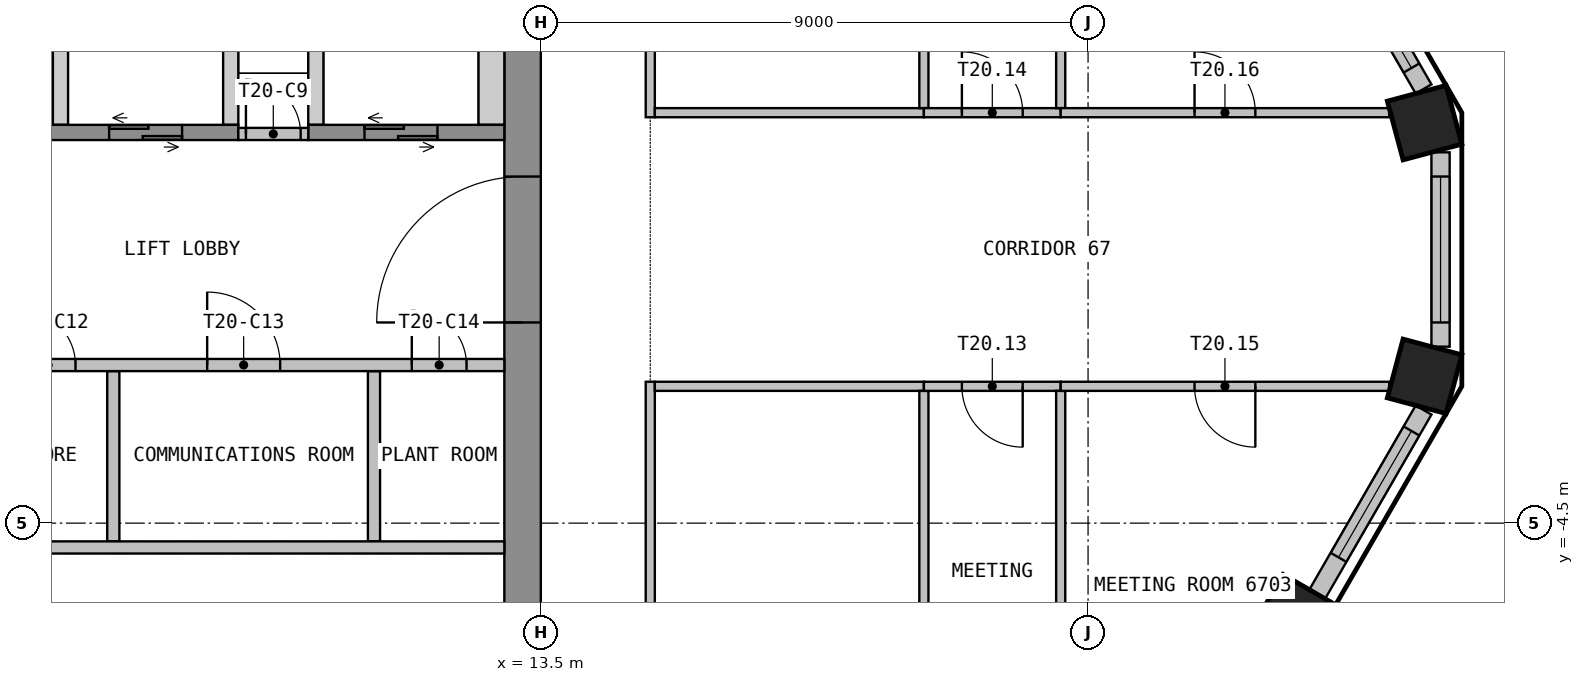
"""IFC4 building model, lengths in metres.
Left out: names, types, materials, properties, quantities, classifications, styles, units other than length and angle.
Written with IfcOpenShell. Run it as: python <this file> out.ifc"""

import sys

from ifc_helpers import new_model, si_unit, direction, frame, frame_2d, origin, origin_2d, place, context, subcontext, project, spatial, polyline, rectangle, outline, extrude, element, fill, save


model = new_model("IFC4")
c1 = context("Model", 3, precision=1e-05, world=origin(), true_north=direction((0.0, 1.0)))
c2 = subcontext(c1, "Body", "Model", "MODEL_VIEW")
j1 = project(units=[si_unit("LENGTHUNIT", "METRE"), si_unit("PLANEANGLEUNIT", "RADIAN")], contexts=[c1])
p1 = place(None, origin())
s1 = spatial("IfcSite", under=j1, at=p1, CompositionType="ELEMENT")
p2 = place(p1, origin())
s2 = spatial("IfcBuilding", under=s1, at=p2, CompositionType="ELEMENT")
p3 = place(p2, frame((0.0, 0.0, 270.3)))
s3 = spatial("IfcBuildingStorey", under=s2, at=p3, CompositionType="ELEMENT", Elevation=270.3)
p4 = place(p3, frame((25.964, -5.897, 0.0), z_axis=(0.0, 0.0, 1.0), x_axis=(0.5, 0.866025403784, 0.0)))
e1 = element("IfcColumn", 1, at=p4, inside=s3, PredefinedType="COLUMN", context=c2, shape_type="SweptSolid", body=[
    extrude(rectangle(XDim=0.7, YDim=1.0, at=origin_2d()), origin(), (0.0, 0.0, 1.0), 3.575),
])
for number, where, z_axis, x_axis in (
    (2, (28.035, -2.086, 0.0), (0.0, 0.0, 1.0), (0.259, 0.966, 0.0)),
    (3, (28.035, 2.086, 0.0), (0.0, 0.0, 1.0), (-0.259, 0.966, 0.0)),
):
    element("IfcColumn", number, at=place(p3, frame(where, z_axis=z_axis, x_axis=x_axis)), inside=s3, PredefinedType="COLUMN", context=c2, shape_type="SweptSolid", body=[
        extrude(rectangle(XDim=1.0, YDim=1.0, at=origin_2d()), origin(), (0.0, 0.0, 1.0), 3.575),
    ])
p5 = place(p3, frame((26.269, -5.669, 0.0), z_axis=(0.0, 0.0, 1.0), x_axis=(0.499990325971, 0.866030989016, 0.0)))
e4 = element("IfcWall", 4, at=p5, inside=s3, PredefinedType="SOLIDWALL", context=c2, shape_type="SweptSolid", body=[
    extrude(rectangle(XDim=3.498, YDim=0.3, at=frame_2d((1.749, 0.0))), origin(), (0.0, 0.0, 1.0), 3.575),
])
p6 = place(p5, frame((0.699, 0.0, 0.9)))
e5 = element("IfcOpeningElement", 5, at=p6, cuts=e4, PredefinedType="OPENING", context=c2, shape_type="SweptSolid", body=[
    extrude(rectangle(XDim=2.4, YDim=2.1, at=frame_2d((1.2, 1.05))), frame((0.0, 0.16, 0.0), z_axis=(0.0, -1.0, 0.0), x_axis=(1.0, 0.0, 0.0)), (0.0, 0.0, 1.0), 0.32),
])
p7 = place(p3, frame((28.297, -1.598, 0.0), z_axis=(0.0, 0.0, 1.0), x_axis=(0.0, 1.0, 0.0)))
e6 = element("IfcWall", 6, at=p7, inside=s3, PredefinedType="SOLIDWALL", context=c2, shape_type="SweptSolid", body=[
    extrude(rectangle(XDim=3.196, YDim=0.3, at=frame_2d((1.598, 0.0))), origin(), (0.0, 0.0, 1.0), 3.575),
])
p8 = place(p7, frame((0.398, 0.0, 0.9)))
e7 = element("IfcOpeningElement", 7, at=p8, cuts=e6, PredefinedType="OPENING", context=c2, shape_type="SweptSolid", body=[
    extrude(rectangle(XDim=2.4, YDim=2.1, at=frame_2d((1.2, 1.05))), frame((0.0, 0.16, 0.0), z_axis=(0.0, -1.0, 0.0), x_axis=(1.0, 0.0, 0.0)), (0.0, 0.0, 1.0), 0.32),
])
p9 = place(p3, frame((28.018, 2.64, 0.0), z_axis=(0.0, 0.0, 1.0), x_axis=(-0.499990325971, 0.866030989016, 0.0)))
e8 = element("IfcWall", 8, at=p9, inside=s3, PredefinedType="SOLIDWALL", context=c2, shape_type="SweptSolid", body=[
    extrude(rectangle(XDim=3.498, YDim=0.3, at=frame_2d((1.749, 0.0))), origin(), (0.0, 0.0, 1.0), 3.575),
])
p10 = place(p9, frame((0.398, 0.0, 0.9)))
e9 = element("IfcOpeningElement", 9, at=p10, cuts=e8, PredefinedType="OPENING", context=c2, shape_type="SweptSolid", body=[
    extrude(rectangle(XDim=2.4, YDim=2.1, at=frame_2d((1.2, 1.05))), frame((0.0, 0.16, 0.0), z_axis=(0.0, -1.0, 0.0), x_axis=(1.0, 0.0, 0.0)), (0.0, 0.0, 1.0), 0.32),
])
p11 = place(p3, frame((13.2, -10.65, 0.0), z_axis=(0.0, 0.0, 1.0), x_axis=(0.0, 1.0, 0.0)))
e10 = element("IfcWall", 10, at=p11, inside=s3, PredefinedType="SHEAR", context=c2, shape_type="SweptSolid", body=[
    extrude(rectangle(XDim=21.3, YDim=0.6, at=frame_2d((10.65, 0.0))), origin(), (0.0, 0.0, 1.0), 3.575),
])
p12 = place(p11, frame((9.45, 0.0, 0.0)))
e11 = element("IfcOpeningElement", 11, at=p12, cuts=e10, PredefinedType="OPENING", context=c2, shape_type="SweptSolid", body=[
    extrude(rectangle(XDim=2.4, YDim=2.1, at=frame_2d((1.2, 1.05))), frame((0.0, 0.31, 0.0), z_axis=(0.0, -1.0, 0.0), x_axis=(1.0, 0.0, 0.0)), (0.0, 0.0, 1.0), 0.62),
])
p13 = place(p3, origin())
e12 = element("IfcWall", 12, at=p13, inside=s3, PredefinedType="SHEAR", context=c2, shape_type="SweptSolid", body=[
    extrude(outline(polyline([(5.475, 2.05), (5.725, 2.05), (5.725, 4.75), (5.475, 4.75), (5.475, 2.05)])), origin(), (0.0, 0.0, 1.0), 3.575),
])
p14 = place(p3, origin())
e13 = element("IfcWall", 13, at=p14, inside=s3, PredefinedType="SHEAR", context=c2, shape_type="SweptSolid", body=[
    extrude(outline(polyline([(8.275, 2.05), (8.525, 2.05), (8.525, 4.75), (8.275, 4.75), (8.275, 2.05)])), origin(), (0.0, 0.0, 1.0), 3.575),
])
p15 = place(p3, origin())
e14 = element("IfcWall", 14, at=p15, inside=s3, PredefinedType="SHEAR", context=c2, shape_type="SweptSolid", body=[
    extrude(outline(polyline([(9.675, 2.05), (9.925, 2.05), (9.925, 4.75), (9.675, 4.75), (9.675, 2.05)])), origin(), (0.0, 0.0, 1.0), 3.575),
])
p16 = place(p3, origin())
e15 = element("IfcWall", 15, at=p16, inside=s3, PredefinedType="SHEAR", context=c2, shape_type="SweptSolid", body=[
    extrude(outline(polyline([(12.475, 2.05), (12.9, 2.05), (12.9, 4.75), (12.475, 4.75), (12.475, 2.05)])), origin(), (0.0, 0.0, 1.0), 3.575),
])
p17 = place(p3, frame((2.675, 1.925, 0.0), z_axis=(0.0, 0.0, 1.0), x_axis=(1.0, 0.0, 0.0)))
e16 = element("IfcWall", 16, at=p17, inside=s3, PredefinedType="SHEAR", context=c2, shape_type="SweptSolid", body=[
    extrude(rectangle(XDim=5.85, YDim=0.25, at=frame_2d((2.925, 0.0))), origin(), (0.0, 0.0, 1.0), 3.575),
])
p18 = place(p17, frame((0.925, 0.0, 0.0)))
e17 = element("IfcOpeningElement", 17, at=p18, cuts=e16, PredefinedType="OPENING", context=c2, shape_type="SweptSolid", body=[
    extrude(rectangle(XDim=1.2, YDim=2.1, at=frame_2d((0.6, 1.05))), frame((0.0, 0.135, 0.0), z_axis=(0.0, -1.0, 0.0), x_axis=(1.0, 0.0, 0.0)), (0.0, 0.0, 1.0), 0.27),
])
p19 = place(p17, frame((3.725, 0.0, 0.0)))
e18 = element("IfcOpeningElement", 18, at=p19, cuts=e16, PredefinedType="OPENING", context=c2, shape_type="SweptSolid", body=[
    extrude(rectangle(XDim=1.2, YDim=2.1, at=frame_2d((0.6, 1.05))), frame((0.0, 0.135, 0.0), z_axis=(0.0, -1.0, 0.0), x_axis=(1.0, 0.0, 0.0)), (0.0, 0.0, 1.0), 0.27),
])
p20 = place(p3, frame((9.675, 1.925, 0.0), z_axis=(0.0, 0.0, 1.0), x_axis=(1.0, 0.0, 0.0)))
e19 = element("IfcWall", 19, at=p20, inside=s3, PredefinedType="SHEAR", context=c2, shape_type="SweptSolid", body=[
    extrude(rectangle(XDim=3.225, YDim=0.25, at=frame_2d((1.612, 0.0))), origin(), (0.0, 0.0, 1.0), 3.575),
])
p21 = place(p20, frame((0.925, 0.0, 0.0)))
e20 = element("IfcOpeningElement", 20, at=p21, cuts=e19, PredefinedType="OPENING", context=c2, shape_type="SweptSolid", body=[
    extrude(rectangle(XDim=1.2, YDim=2.1, at=frame_2d((0.6, 1.05))), frame((0.0, 0.135, 0.0), z_axis=(0.0, -1.0, 0.0), x_axis=(1.0, 0.0, 0.0)), (0.0, 0.0, 1.0), 0.27),
])
p22 = place(p3, frame((8.525, 1.9, 0.0), z_axis=(0.0, 0.0, 1.0), x_axis=(1.0, 0.0, 0.0)))
e21 = element("IfcWall", 21, at=p22, inside=s3, PredefinedType="PARTITIONING", context=c2, shape_type="SweptSolid", body=[
    extrude(rectangle(XDim=1.15, YDim=0.2, at=frame_2d((0.575, 0.0))), origin(), (0.0, 0.0, 1.0), 3.575),
])
p23 = place(p22, frame((0.125, 0.0, 0.0)))
e22 = element("IfcOpeningElement", 22, at=p23, cuts=e21, PredefinedType="OPENING", context=c2, shape_type="SweptSolid", body=[
    extrude(rectangle(XDim=0.9, YDim=2.1, at=frame_2d((0.45, 1.05))), frame((0.0, 0.11, 0.0), z_axis=(0.0, -1.0, 0.0), x_axis=(1.0, 0.0, 0.0)), (0.0, 0.0, 1.0), 0.22),
])
for number, where, z_axis, x_axis in (
    (23, (6.469, -4.8, 0.0), (0.0, 0.0, 1.0), (0.0, 1.0, 0.0)),
    (24, (10.756, -4.8, 0.0), (0.0, 0.0, 1.0), (0.0, 1.0, 0.0)),
):
    element("IfcWall", number, at=place(p3, frame(where, z_axis=z_axis, x_axis=x_axis)), inside=s3, PredefinedType="PARTITIONING", context=c2, shape_type="SweptSolid", body=[
        extrude(rectangle(XDim=2.8, YDim=0.2, at=frame_2d((1.4, 0.0))), origin(), (0.0, 0.0, 1.0), 3.575),
    ])
p24 = place(p3, frame((4.325, -1.9, 0.0), z_axis=(0.0, 0.0, 1.0), x_axis=(1.0, 0.0, 0.0)))
e25 = element("IfcWall", 25, at=p24, inside=s3, PredefinedType="PARTITIONING", context=c2, shape_type="SweptSolid", body=[
    extrude(rectangle(XDim=8.575, YDim=0.2, at=frame_2d((4.288, 0.0))), origin(), (0.0, 0.0, 1.0), 3.575),
])
p25 = place(p24, frame((0.622, 0.0, 0.0)))
e26 = element("IfcOpeningElement", 26, at=p25, cuts=e25, PredefinedType="OPENING", context=c2, shape_type="SweptSolid", body=[
    extrude(rectangle(XDim=0.9, YDim=2.1, at=frame_2d((0.45, 1.05))), frame((0.0, 0.11, 0.0), z_axis=(0.0, -1.0, 0.0), x_axis=(1.0, 0.0, 0.0)), (0.0, 0.0, 1.0), 0.22),
])
p26 = place(p24, frame((3.688, 0.0, 0.0)))
e27 = element("IfcOpeningElement", 27, at=p26, cuts=e25, PredefinedType="OPENING", context=c2, shape_type="SweptSolid", body=[
    extrude(rectangle(XDim=1.2, YDim=2.1, at=frame_2d((0.6, 1.05))), frame((0.0, 0.11, 0.0), z_axis=(0.0, -1.0, 0.0), x_axis=(1.0, 0.0, 0.0)), (0.0, 0.0, 1.0), 0.22),
])
p27 = place(p24, frame((7.053, 0.0, 0.0)))
e28 = element("IfcOpeningElement", 28, at=p27, cuts=e25, PredefinedType="OPENING", context=c2, shape_type="SweptSolid", body=[
    extrude(rectangle(XDim=0.9, YDim=2.1, at=frame_2d((0.45, 1.05))), frame((0.0, 0.11, 0.0), z_axis=(0.0, -1.0, 0.0), x_axis=(1.0, 0.0, 0.0)), (0.0, 0.0, 1.0), 0.22),
])
p28 = place(p3, frame((4.325, -4.9, 0.0), z_axis=(0.0, 0.0, 1.0), x_axis=(1.0, 0.0, 0.0)))
e29 = element("IfcWall", 29, at=p28, inside=s3, PredefinedType="PARTITIONING", context=c2, shape_type="SweptSolid", body=[
    extrude(rectangle(XDim=8.575, YDim=0.2, at=frame_2d((4.288, 0.0))), origin(), (0.0, 0.0, 1.0), 3.575),
])
p29 = place(p3, frame((15.3, -12.975, 0.0), z_axis=(0.0, 0.0, 1.0), x_axis=(0.0, 1.0, 0.0)))
e30 = element("IfcWall", 30, at=p29, inside=s3, PredefinedType="PARTITIONING", context=c2, shape_type="SweptSolid", body=[
    extrude(rectangle(XDim=10.8, YDim=0.15, at=frame_2d((5.4, 0.0))), origin(), (0.0, 0.0, 1.0), 3.575),
])
p30 = place(p29, frame((4.9, 0.0, 0.0)))
e31 = element("IfcOpeningElement", 31, at=p30, cuts=e30, PredefinedType="OPENING", context=c2, shape_type="SweptSolid", body=[
    extrude(rectangle(XDim=1.0, YDim=2.1, at=frame_2d((0.5, 1.05))), frame((0.0, 0.085, 0.0), z_axis=(0.0, -1.0, 0.0), x_axis=(1.0, 0.0, 0.0)), (0.0, 0.0, 1.0), 0.17),
])
p31 = place(p3, frame((19.8, -2.25, 0.0), z_axis=(0.0, 0.0, 1.0), x_axis=(-1.0, 0.0, 0.0)))
e32 = element("IfcWall", 32, at=p31, inside=s3, PredefinedType="PARTITIONING", context=c2, shape_type="SweptSolid", body=[
    extrude(rectangle(XDim=4.425, YDim=0.15, at=frame_2d((2.212, 0.0))), origin(), (0.0, 0.0, 1.0), 3.575),
])
p32 = place(p3, frame((15.3, 2.175, 0.0), z_axis=(0.0, 0.0, 1.0), x_axis=(0.0, 1.0, 0.0)))
e33 = element("IfcWall", 33, at=p32, inside=s3, PredefinedType="PARTITIONING", context=c2, shape_type="SweptSolid", body=[
    extrude(rectangle(XDim=7.957, YDim=0.15, at=frame_2d((3.979, 0.0))), origin(), (0.0, 0.0, 1.0), 3.575),
])
p33 = place(p32, frame((3.479, 0.0, 0.0)))
e34 = element("IfcOpeningElement", 34, at=p33, cuts=e33, PredefinedType="OPENING", context=c2, shape_type="SweptSolid", body=[
    extrude(rectangle(XDim=1.0, YDim=2.1, at=frame_2d((0.5, 1.05))), frame((0.0, 0.085, 0.0), z_axis=(0.0, -1.0, 0.0), x_axis=(1.0, 0.0, 0.0)), (0.0, 0.0, 1.0), 0.17),
])
p34 = place(p3, frame((15.375, 2.25, 0.0), z_axis=(0.0, 0.0, 1.0), x_axis=(1.0, 0.0, 0.0)))
e35 = element("IfcWall", 35, at=p34, inside=s3, PredefinedType="PARTITIONING", context=c2, shape_type="SweptSolid", body=[
    extrude(rectangle(XDim=4.425, YDim=0.15, at=frame_2d((2.212, 0.0))), origin(), (0.0, 0.0, 1.0), 3.575),
])
p35 = place(p3, frame((19.8, -2.325, 0.0), z_axis=(0.0, 0.0, 1.0), x_axis=(0.0, -1.0, 0.0)))
e36 = element("IfcWall", 36, at=p35, inside=s3, PredefinedType="PARTITIONING", context=c2, shape_type="SweptSolid", body=[
    extrude(rectangle(XDim=10.481, YDim=0.15, at=frame_2d((5.24, 0.0))), origin(), (0.0, 0.0, 1.0), 3.575),
])
p36 = place(p3, frame((22.05, -2.25, 0.0), z_axis=(0.0, 0.0, 1.0), x_axis=(-1.0, 0.0, 0.0)))
e37 = element("IfcWall", 37, at=p36, inside=s3, PredefinedType="PARTITIONING", context=c2, shape_type="SweptSolid", body=[
    extrude(rectangle(XDim=2.25, YDim=0.15, at=frame_2d((1.125, 0.0))), origin(), (0.0, 0.0, 1.0), 3.575),
])
p37 = place(p36, frame((0.625, 0.0, 0.0)))
e38 = element("IfcOpeningElement", 38, at=p37, cuts=e37, PredefinedType="OPENING", context=c2, shape_type="SweptSolid", body=[
    extrude(rectangle(XDim=1.0, YDim=2.1, at=frame_2d((0.5, 1.05))), frame((0.0, 0.085, 0.0), z_axis=(0.0, -1.0, 0.0), x_axis=(1.0, 0.0, 0.0)), (0.0, 0.0, 1.0), 0.17),
])
p38 = place(p3, frame((19.8, 12.655, 0.0), z_axis=(0.0, 0.0, 1.0), x_axis=(0.0, -1.0, 0.0)))
e39 = element("IfcWall", 39, at=p38, inside=s3, PredefinedType="PARTITIONING", context=c2, shape_type="SweptSolid", body=[
    extrude(rectangle(XDim=10.33, YDim=0.15, at=frame_2d((5.165, 0.0))), origin(), (0.0, 0.0, 1.0), 3.575),
])
p39 = place(p3, frame((19.8, 2.25, 0.0), z_axis=(0.0, 0.0, 1.0), x_axis=(1.0, 0.0, 0.0)))
e40 = element("IfcWall", 40, at=p39, inside=s3, PredefinedType="PARTITIONING", context=c2, shape_type="SweptSolid", body=[
    extrude(rectangle(XDim=2.25, YDim=0.15, at=frame_2d((1.125, 0.0))), origin(), (0.0, 0.0, 1.0), 3.575),
])
p40 = place(p39, frame((0.625, 0.0, 0.0)))
e41 = element("IfcOpeningElement", 41, at=p40, cuts=e40, PredefinedType="OPENING", context=c2, shape_type="SweptSolid", body=[
    extrude(rectangle(XDim=1.0, YDim=2.1, at=frame_2d((0.5, 1.05))), frame((0.0, 0.085, 0.0), z_axis=(0.0, -1.0, 0.0), x_axis=(1.0, 0.0, 0.0)), (0.0, 0.0, 1.0), 0.17),
])
p41 = place(p3, frame((22.05, -2.325, 0.0), z_axis=(0.0, 0.0, 1.0), x_axis=(0.0, -1.0, 0.0)))
e42 = element("IfcWall", 42, at=p41, inside=s3, PredefinedType="PARTITIONING", context=c2, shape_type="SweptSolid", body=[
    extrude(rectangle(XDim=6.583, YDim=0.15, at=frame_2d((3.292, 0.0))), origin(), (0.0, 0.0, 1.0), 3.575),
])
p42 = place(p3, frame((27.452, -2.25, 0.0), z_axis=(0.0, 0.0, 1.0), x_axis=(-1.0, 0.0, 0.0)))
e43 = element("IfcWall", 43, at=p42, inside=s3, PredefinedType="PARTITIONING", context=c2, shape_type="SweptSolid", body=[
    extrude(rectangle(XDim=5.402, YDim=0.15, at=frame_2d((2.701, 0.0))), origin(), (0.0, 0.0, 1.0), 3.575),
])
p43 = place(p42, frame((2.201, 0.0, 0.0)))
e44 = element("IfcOpeningElement", 44, at=p43, cuts=e43, PredefinedType="OPENING", context=c2, shape_type="SweptSolid", body=[
    extrude(rectangle(XDim=1.0, YDim=2.1, at=frame_2d((0.5, 1.05))), frame((0.0, 0.085, 0.0), z_axis=(0.0, -1.0, 0.0), x_axis=(1.0, 0.0, 0.0)), (0.0, 0.0, 1.0), 0.17),
])
p44 = place(p3, frame((22.05, 8.908, 0.0), z_axis=(0.0, 0.0, 1.0), x_axis=(0.0, -1.0, 0.0)))
e45 = element("IfcWall", 45, at=p44, inside=s3, PredefinedType="PARTITIONING", context=c2, shape_type="SweptSolid", body=[
    extrude(rectangle(XDim=6.583, YDim=0.15, at=frame_2d((3.292, 0.0))), origin(), (0.0, 0.0, 1.0), 3.575),
])
p45 = place(p3, frame((22.05, 2.25, 0.0), z_axis=(0.0, 0.0, 1.0), x_axis=(1.0, 0.0, 0.0)))
e46 = element("IfcWall", 46, at=p45, inside=s3, PredefinedType="PARTITIONING", context=c2, shape_type="SweptSolid", body=[
    extrude(rectangle(XDim=5.402, YDim=0.15, at=frame_2d((2.701, 0.0))), origin(), (0.0, 0.0, 1.0), 3.575),
])
p46 = place(p45, frame((2.201, 0.0, 0.0)))
e47 = element("IfcOpeningElement", 47, at=p46, cuts=e46, PredefinedType="OPENING", context=c2, shape_type="SweptSolid", body=[
    extrude(rectangle(XDim=1.0, YDim=2.1, at=frame_2d((0.5, 1.05))), frame((0.0, 0.085, 0.0), z_axis=(0.0, -1.0, 0.0), x_axis=(1.0, 0.0, 0.0)), (0.0, 0.0, 1.0), 0.17),
])
p47 = place(p6, origin())
e48 = element("IfcWindow", 48, at=p47, inside=s3, PartitioningType="SINGLE_PANEL", PredefinedType="WINDOW", context=c2, shape_type="SweptSolid", body=[
    extrude(rectangle(XDim=2.4, YDim=2.1, at=frame_2d((1.2, 1.05))), frame((0.0, 0.03, 0.0), z_axis=(0.0, -1.0, 0.0), x_axis=(1.0, 0.0, 0.0)), (0.0, 0.0, 1.0), 0.06),
])
fill(e5, e48)
p48 = place(p8, origin())
e49 = element("IfcWindow", 49, at=p48, inside=s3, PartitioningType="SINGLE_PANEL", PredefinedType="WINDOW", context=c2, shape_type="SweptSolid", body=[
    extrude(rectangle(XDim=2.4, YDim=2.1, at=frame_2d((1.2, 1.05))), frame((0.0, 0.03, 0.0), z_axis=(0.0, -1.0, 0.0), x_axis=(1.0, 0.0, 0.0)), (0.0, 0.0, 1.0), 0.06),
])
fill(e7, e49)
p49 = place(p10, origin())
e50 = element("IfcWindow", 50, at=p49, inside=s3, PartitioningType="SINGLE_PANEL", PredefinedType="WINDOW", context=c2, shape_type="SweptSolid", body=[
    extrude(rectangle(XDim=2.4, YDim=2.1, at=frame_2d((1.2, 1.05))), frame((0.0, 0.03, 0.0), z_axis=(0.0, -1.0, 0.0), x_axis=(1.0, 0.0, 0.0)), (0.0, 0.0, 1.0), 0.06),
])
fill(e9, e50)
p50 = place(p12, origin())
e51 = element("IfcDoor", 51, at=p50, inside=s3, OperationType="DOUBLE_DOOR_DOUBLE_SWING", PredefinedType="DOOR", context=c2, shape_type="SweptSolid", body=[
    extrude(rectangle(XDim=2.4, YDim=2.1, at=frame_2d((1.2, 1.05))), frame((0.0, 0.025, 0.0), z_axis=(0.0, -1.0, 0.0), x_axis=(1.0, 0.0, 0.0)), (0.0, 0.0, 1.0), 0.05),
])
fill(e11, e51)
p51 = place(p19, origin())
e52 = element("IfcDoor", 52, at=p51, inside=s3, OperationType="DOUBLE_DOOR_SLIDING", PredefinedType="DOOR", context=c2, shape_type="SweptSolid", body=[
    extrude(rectangle(XDim=1.2, YDim=2.1, at=frame_2d((0.6, 1.05))), frame((0.0, 0.025, 0.0), z_axis=(0.0, -1.0, 0.0), x_axis=(1.0, 0.0, 0.0)), (0.0, 0.0, 1.0), 0.05),
])
fill(e18, e52)
p52 = place(p21, origin())
e53 = element("IfcDoor", 53, at=p52, inside=s3, OperationType="DOUBLE_DOOR_SLIDING", PredefinedType="DOOR", context=c2, shape_type="SweptSolid", body=[
    extrude(rectangle(XDim=1.2, YDim=2.1, at=frame_2d((0.6, 1.05))), frame((0.0, 0.025, 0.0), z_axis=(0.0, -1.0, 0.0), x_axis=(1.0, 0.0, 0.0)), (0.0, 0.0, 1.0), 0.05),
])
fill(e20, e53)
p53 = place(p23, origin())
e54 = element("IfcDoor", 54, at=p53, inside=s3, OperationType="SINGLE_SWING_LEFT", PredefinedType="DOOR", context=c2, shape_type="SweptSolid", body=[
    extrude(rectangle(XDim=0.9, YDim=2.1, at=frame_2d((0.45, 1.05))), frame((0.0, 0.025, 0.0), z_axis=(0.0, -1.0, 0.0), x_axis=(1.0, 0.0, 0.0)), (0.0, 0.0, 1.0), 0.05),
])
fill(e22, e54)
p54 = place(p25, origin())
e55 = element("IfcDoor", 55, at=p54, inside=s3, OperationType="SINGLE_SWING_LEFT", PredefinedType="DOOR", context=c2, shape_type="SweptSolid", body=[
    extrude(rectangle(XDim=0.9, YDim=2.1, at=frame_2d((0.45, 1.05))), frame((0.0, 0.025, 0.0), z_axis=(0.0, -1.0, 0.0), x_axis=(1.0, 0.0, 0.0)), (0.0, 0.0, 1.0), 0.05),
])
fill(e26, e55)
p55 = place(p26, origin())
e56 = element("IfcDoor", 56, at=p55, inside=s3, OperationType="SINGLE_SWING_RIGHT", PredefinedType="DOOR", context=c2, shape_type="SweptSolid", body=[
    extrude(rectangle(XDim=1.2, YDim=2.1, at=frame_2d((0.6, 1.05))), frame((0.0, 0.025, 0.0), z_axis=(0.0, -1.0, 0.0), x_axis=(1.0, 0.0, 0.0)), (0.0, 0.0, 1.0), 0.05),
])
fill(e27, e56)
p56 = place(p27, origin())
e57 = element("IfcDoor", 57, at=p56, inside=s3, OperationType="SINGLE_SWING_LEFT", PredefinedType="DOOR", context=c2, shape_type="SweptSolid", body=[
    extrude(rectangle(XDim=0.9, YDim=2.1, at=frame_2d((0.45, 1.05))), frame((0.0, 0.025, 0.0), z_axis=(0.0, -1.0, 0.0), x_axis=(1.0, 0.0, 0.0)), (0.0, 0.0, 1.0), 0.05),
])
fill(e28, e57)
p57 = place(p37, origin())
e58 = element("IfcDoor", 58, at=p57, inside=s3, OperationType="SINGLE_SWING_RIGHT", PredefinedType="DOOR", context=c2, shape_type="SweptSolid", body=[
    extrude(rectangle(XDim=1.0, YDim=2.1, at=frame_2d((0.5, 1.05))), frame((0.0, 0.025, 0.0), z_axis=(0.0, -1.0, 0.0), x_axis=(1.0, 0.0, 0.0)), (0.0, 0.0, 1.0), 0.05),
])
fill(e38, e58)
p58 = place(p40, origin())
e59 = element("IfcDoor", 59, at=p58, inside=s3, OperationType="SINGLE_SWING_LEFT", PredefinedType="DOOR", context=c2, shape_type="SweptSolid", body=[
    extrude(rectangle(XDim=1.0, YDim=2.1, at=frame_2d((0.5, 1.05))), frame((0.0, 0.025, 0.0), z_axis=(0.0, -1.0, 0.0), x_axis=(1.0, 0.0, 0.0)), (0.0, 0.0, 1.0), 0.05),
])
fill(e41, e59)
p59 = place(p43, origin())
e60 = element("IfcDoor", 60, at=p59, inside=s3, OperationType="SINGLE_SWING_RIGHT", PredefinedType="DOOR", context=c2, shape_type="SweptSolid", body=[
    extrude(rectangle(XDim=1.0, YDim=2.1, at=frame_2d((0.5, 1.05))), frame((0.0, 0.025, 0.0), z_axis=(0.0, -1.0, 0.0), x_axis=(1.0, 0.0, 0.0)), (0.0, 0.0, 1.0), 0.05),
])
fill(e44, e60)
p60 = place(p46, origin())
e61 = element("IfcDoor", 61, at=p60, inside=s3, OperationType="SINGLE_SWING_RIGHT", PredefinedType="DOOR", context=c2, shape_type="SweptSolid", body=[
    extrude(rectangle(XDim=1.0, YDim=2.1, at=frame_2d((0.5, 1.05))), frame((0.0, 0.025, 0.0), z_axis=(0.0, -1.0, 0.0), x_axis=(1.0, 0.0, 0.0)), (0.0, 0.0, 1.0), 0.05),
])
fill(e47, e61)
save(model, sys.argv[1])
